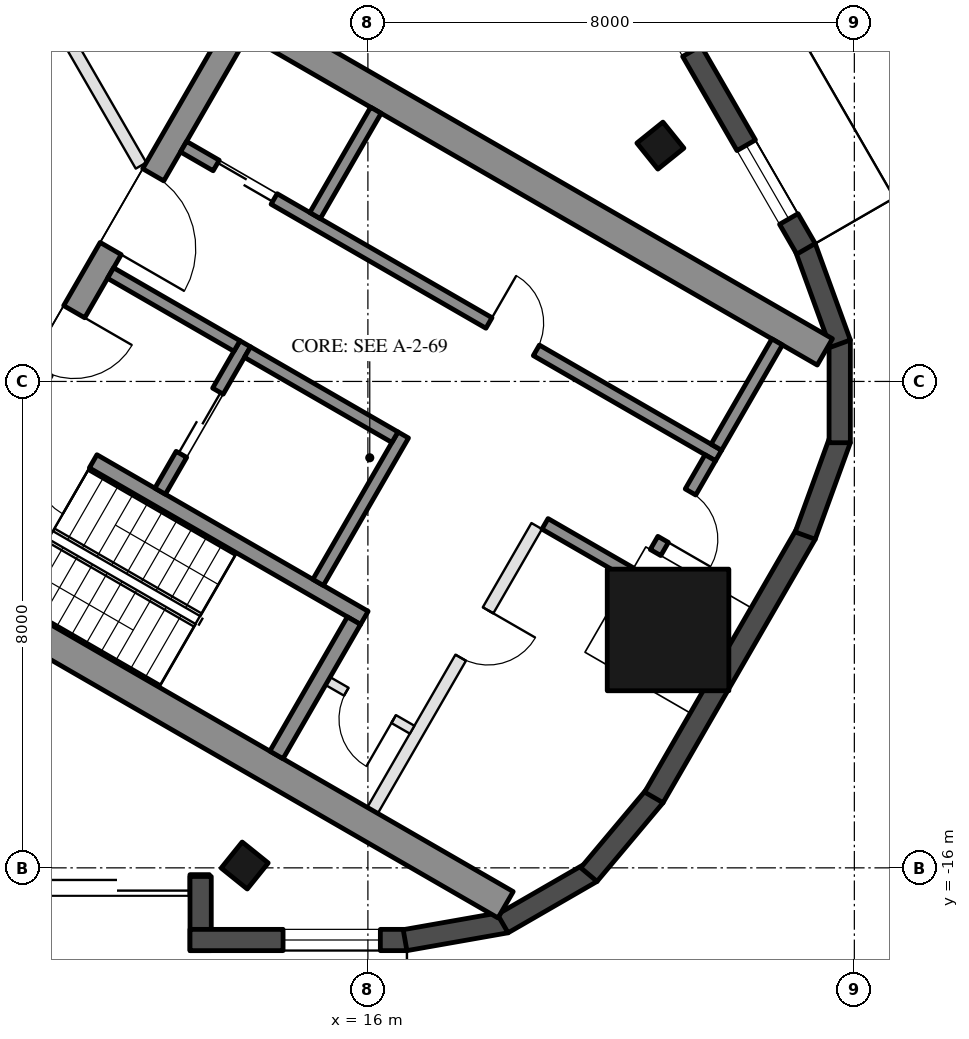
"""IFC4 building model, lengths in metres.
Left out: names, types, materials, properties, quantities, classifications, styles, units other than length and angle.
Written with IfcOpenShell. Run it as: python <this file> out.ifc"""

import sys

from ifc_helpers import new_model, si_unit, direction, frame, frame_2d, origin, origin_2d, place, context, subcontext, project, spatial, rectangle, hollow_rectangle, extrude, boolean, halfspace, element, fill, save


model = new_model("IFC4")
c1 = context("Model", 3, precision=1e-05, world=origin(), true_north=direction((0.0, 1.0)))
c2 = subcontext(c1, "Body", "Model", "MODEL_VIEW")
j1 = project(units=[si_unit("LENGTHUNIT", "METRE"), si_unit("PLANEANGLEUNIT", "RADIAN")], contexts=[c1])
p1 = place(None, origin())
s1 = spatial("IfcSite", under=j1, at=p1, CompositionType="ELEMENT")
p2 = place(p1, origin())
s2 = spatial("IfcBuilding", under=s1, at=p2, CompositionType="ELEMENT")
p3 = place(p2, frame((0.0, 0.0, 298.5)))
s3 = spatial("IfcBuildingStorey", under=s2, at=p3, CompositionType="ELEMENT", Elevation=298.5)
p4 = place(p3, frame((13.974, -15.962, 0.0), z_axis=(-0.121006106938, 0.150399778714, 0.981191840899), x_axis=(0.992607126943, 0.008959505222, 0.121040566785)))
e1 = element("IfcColumn", 1, at=p4, inside=s3, PredefinedType="COLUMN", context=c2, shape_type="SweptSolid", body=[
    boolean("DIFFERENCE", boolean("DIFFERENCE", extrude(hollow_rectangle(XDim=0.55, YDim=0.55, WallThickness=0.025, at=origin_2d()), origin(), (0.0, 0.0, 1.0), 3.771), halfspace(frame((0.0, 0.0, 0.04), z_axis=(0.0, 0.0, 1.0), x_axis=(1.0, 0.0, 0.0)), True)), halfspace(frame((0.0, 0.0, 3.731), z_axis=(0.0, 0.0, 1.0), x_axis=(1.0, 0.0, 0.0)), False)),
])
p5 = place(p3, frame((20.81, -4.121, 0.0), z_axis=(-0.190735837279, 0.02958801006, 0.981195388309), x_axis=(0.488489055842, -0.864137452388, 0.121016138189)))
e2 = element("IfcColumn", 2, at=p5, inside=s3, PredefinedType="COLUMN", context=c2, shape_type="SweptSolid", body=[
    boolean("DIFFERENCE", boolean("DIFFERENCE", extrude(hollow_rectangle(XDim=0.55, YDim=0.55, WallThickness=0.025, at=origin_2d()), origin(), (0.0, 0.0, 1.0), 3.771), halfspace(frame((0.0, 0.0, 0.04), z_axis=(0.0, 0.0, 1.0), x_axis=(1.0, 0.0, 0.0)), True)), halfspace(frame((0.0, 0.0, 3.731), z_axis=(0.0, 0.0, 1.0), x_axis=(1.0, 0.0, 0.0)), False)),
])
p6 = place(p3, frame((20.936, -12.087, 0.0), z_axis=(-0.190408197016, 0.109880592395, 0.975536249416), x_axis=(0.499868084483, 0.866101551773, 1.1510724e-05)))
e3 = element("IfcColumn", 3, at=p6, inside=s3, PredefinedType="COLUMN", context=c2, shape_type="SweptSolid", body=[
    boolean("DIFFERENCE", boolean("DIFFERENCE", extrude(hollow_rectangle(XDim=2.0, YDim=2.0, WallThickness=0.05, at=origin_2d()), origin(), (0.0, 0.0, 1.0), 3.793), halfspace(frame((0.0, 0.0, 0.113), z_axis=(0.0, 0.0, 1.0), x_axis=(1.0, 0.0, 0.0)), True)), halfspace(frame((0.0, 0.0, 3.679), z_axis=(0.0, 0.0, 1.0), x_axis=(1.0, 0.0, 0.0)), False)),
])
p7 = place(p3, frame((7.567, -16.287, 0.0), z_axis=(0.0, 0.0, 1.0), x_axis=(1.0, 0.0, 0.0)))
e4 = element("IfcWall", 4, at=p7, inside=s3, PredefinedType="SOLIDWALL", context=c2, shape_type="SweptSolid", body=[
    extrude(rectangle(XDim=5.827, YDim=0.35, at=frame_2d((2.914, 0.0))), origin(), (0.0, 0.0, 1.0), 3.55),
])
p8 = place(p7, frame((3.107, 0.0, 0.0)))
e5 = element("IfcOpeningElement", 5, at=p8, cuts=e4, PredefinedType="OPENING", context=c2, shape_type="SweptSolid", body=[
    extrude(rectangle(XDim=2.4, YDim=2.4, at=frame_2d((1.2, 1.2))), frame((0.0, 0.185, 0.0), z_axis=(0.0, -1.0, 0.0), x_axis=(1.0, 0.0, 0.0)), (0.0, 0.0, 1.0), 0.37),
])
p9 = place(p7, frame((0.617, 0.0, 0.3)))
e6 = element("IfcOpeningElement", 6, at=p9, cuts=e4, PredefinedType="OPENING", context=c2, shape_type="SweptSolid", body=[
    extrude(rectangle(XDim=2.1, YDim=2.65, at=frame_2d((1.05, 1.325))), frame((0.0, 0.185, 0.0), z_axis=(0.0, -1.0, 0.0), x_axis=(1.0, 0.0, 0.0)), (0.0, 0.0, 1.0), 0.37),
])
p10 = place(p3, frame((13.249, -16.142, 0.0), z_axis=(0.0, 0.0, 1.0), x_axis=(0.0, -1.0, 0.0)))
e7 = element("IfcWall", 7, at=p10, inside=s3, PredefinedType="SOLIDWALL", context=c2, shape_type="SweptSolid", body=[
    extrude(rectangle(XDim=1.22, YDim=0.35, at=frame_2d((0.61, 0.0))), origin(), (0.0, 0.0, 1.0), 3.55),
])
p11 = place(p3, frame((13.074, -17.187, 0.0), z_axis=(0.0, 0.0, 1.0), x_axis=(1.0, 0.0, 0.0)))
e8 = element("IfcWall", 8, at=p11, inside=s3, PredefinedType="SOLIDWALL", context=c2, shape_type="SweptSolid", body=[
    extrude(rectangle(XDim=3.567, YDim=0.35, at=frame_2d((1.784, 0.0))), origin(), (0.0, 0.0, 1.0), 3.55),
])
p12 = place(p11, frame((1.531, 0.0, 0.3)))
e9 = element("IfcOpeningElement", 9, at=p12, cuts=e8, PredefinedType="OPENING", context=c2, shape_type="SweptSolid", body=[
    extrude(rectangle(XDim=1.6, YDim=2.65, at=frame_2d((0.8, 1.325))), frame((0.0, 0.185, 0.0), z_axis=(0.0, -1.0, 0.0), x_axis=(1.0, 0.0, 0.0)), (0.0, 0.0, 1.0), 0.37),
])
for number, where, z_axis, x_axis in (
    (10, (16.611, -17.189, 0.0), (0.0, 0.0, 1.0), (0.985, 0.174, 0.0)),
    (11, (18.218, -16.917, 0.0), (0.0, 0.0, 1.0), (0.866, 0.5, 0.0)),
):
    element("IfcWall", number, at=place(p3, frame(where, z_axis=z_axis, x_axis=x_axis)), inside=s3, PredefinedType="SOLIDWALL", context=c2, shape_type="SweptSolid", body=[
        extrude(rectangle(XDim=1.689, YDim=0.35, at=frame_2d((0.845, 0.0))), origin(), (0.0, 0.0, 1.0), 3.55),
    ])
p13 = place(p3, frame((19.635, -16.111, 0.0), z_axis=(0.0, 0.0, 1.0), x_axis=(0.642697100627, 0.766120380127, 0.0)))
e12 = element("IfcWall", 12, at=p13, inside=s3, PredefinedType="SOLIDWALL", context=c2, shape_type="SweptSolid", body=[
    extrude(rectangle(XDim=1.689, YDim=0.35, at=frame_2d((0.845, 0.0))), origin(), (0.0, 0.0, 1.0), 3.55),
])
p14 = place(p3, frame((20.703, -14.842, 0.0), z_axis=(0.0, 0.0, 1.0), x_axis=(0.500016662025, 0.866015783746, 0.0)))
e13 = element("IfcWall", 13, at=p14, inside=s3, PredefinedType="SOLIDWALL", context=c2, shape_type="SweptSolid", body=[
    extrude(rectangle(XDim=5.004, YDim=0.35, at=frame_2d((2.502, 0.0))), origin(), (0.0, 0.0, 1.0), 3.55),
])
for number, where, z_axis, x_axis in (
    (14, (23.192, -10.536, 0.0), (0.0, 0.0, 1.0), (0.342, 0.94, 0.0)),
    (15, (23.759, -9.008, 0.0), (0.0, 0.0, 1.0), (0.0, 1.0, 0.0)),
    (16, (23.77, -7.379, 0.0), (0.0, 0.0, 1.0), (-0.342, 0.94, 0.0)),
):
    element("IfcWall", number, at=place(p3, frame(where, z_axis=z_axis, x_axis=x_axis)), inside=s3, PredefinedType="SOLIDWALL", context=c2, shape_type="SweptSolid", body=[
        extrude(rectangle(XDim=1.689, YDim=0.35, at=frame_2d((0.845, 0.0))), origin(), (0.0, 0.0, 1.0), 3.55),
    ])
p15 = place(p3, frame((23.205, -5.819, 0.0), z_axis=(0.0, 0.0, 1.0), x_axis=(-0.500010118922, 0.866019561543, 0.0)))
e17 = element("IfcWall", 17, at=p15, inside=s3, PredefinedType="SOLIDWALL", context=c2, shape_type="SweptSolid", body=[
    extrude(rectangle(XDim=10.554, YDim=0.35, at=frame_2d((5.277, 0.0))), origin(), (0.0, 0.0, 1.0), 3.55),
])
p16 = place(p15, frame((0.566, 0.0, 0.3)))
e18 = element("IfcOpeningElement", 18, at=p16, cuts=e17, PredefinedType="OPENING", context=c2, shape_type="SweptSolid", body=[
    extrude(rectangle(XDim=1.4, YDim=2.65, at=frame_2d((0.7, 1.325))), frame((0.0, 0.185, 0.0), z_axis=(0.0, -1.0, 0.0), x_axis=(1.0, 0.0, 0.0)), (0.0, 0.0, 1.0), 0.37),
])
p17 = place(p15, frame((6.626, 0.0, 0.0)))
e19 = element("IfcOpeningElement", 19, at=p17, cuts=e17, PredefinedType="OPENING", context=c2, shape_type="SweptSolid", body=[
    extrude(rectangle(XDim=2.4, YDim=2.4, at=frame_2d((1.2, 1.2))), frame((0.0, 0.185, 0.0), z_axis=(0.0, -1.0, 0.0), x_axis=(1.0, 0.0, 0.0)), (0.0, 0.0, 1.0), 0.37),
])
p18 = place(p15, frame((3.754, 0.0, 0.3)))
e20 = element("IfcOpeningElement", 20, at=p18, cuts=e17, PredefinedType="OPENING", context=c2, shape_type="SweptSolid", body=[
    extrude(rectangle(XDim=2.5, YDim=2.65, at=frame_2d((1.25, 1.325))), frame((0.0, 0.185, 0.0), z_axis=(0.0, -1.0, 0.0), x_axis=(1.0, 0.0, 0.0)), (0.0, 0.0, 1.0), 0.37),
])
for number, where, z_axis, x_axis in (
    (21, (8.547, -10.997, 0.0), (0.0, 0.0, 1.0), (0.866, -0.5, 0.0)),
    (22, (13.797, -1.903, 0.0), (0.0, 0.0, 1.0), (0.866, -0.5, 0.0)),
):
    element("IfcWall", number, at=place(p3, frame(where, z_axis=z_axis, x_axis=x_axis)), inside=s3, PredefinedType="SHEAR", context=c2, shape_type="SweptSolid", body=[
        extrude(rectangle(XDim=11.222, YDim=0.5, at=frame_2d((5.611, 0.0))), origin(), (0.0, 0.0, 1.0), 3.5),
    ])
p19 = place(p3, frame((8.845, -10.88, 0.0), z_axis=(0.0, 0.0, 1.0), x_axis=(0.500004234368, 0.866022959057, 0.0)))
e23 = element("IfcWall", 23, at=p19, inside=s3, PredefinedType="SHEAR", context=c2, shape_type="SweptSolid", body=[
    extrude(rectangle(XDim=10.0, YDim=0.4, at=frame_2d((5.0, 0.0))), origin(), (0.0, 0.0, 1.0), 3.5),
])
p20 = place(p19, frame((3.55, 0.0, 0.0)))
e24 = element("IfcOpeningElement", 24, at=p20, cuts=e23, PredefinedType="OPENING", context=c2, shape_type="SweptSolid", body=[
    extrude(rectangle(XDim=1.1, YDim=2.1, at=frame_2d((0.55, 1.05))), frame((0.0, 0.21, 0.0), z_axis=(0.0, -1.0, 0.0), x_axis=(1.0, 0.0, 0.0)), (0.0, 0.0, 1.0), 0.42),
])
p21 = place(p19, frame((5.85, 0.0, 0.0)))
e25 = element("IfcOpeningElement", 25, at=p21, cuts=e23, PredefinedType="OPENING", context=c2, shape_type="SweptSolid", body=[
    extrude(rectangle(XDim=1.4, YDim=2.1, at=frame_2d((0.7, 1.05))), frame((0.0, 0.21, 0.0), z_axis=(0.0, -1.0, 0.0), x_axis=(1.0, 0.0, 0.0)), (0.0, 0.0, 1.0), 0.42),
])
p22 = place(p3, frame((10.356, -8.664, 0.0), z_axis=(0.0, 0.0, 1.0), x_axis=(0.866028629588, -0.499994412703, 0.0)))
e26 = element("IfcWall", 26, at=p22, inside=s3, PredefinedType="SHEAR", context=c2, shape_type="SweptSolid", body=[
    extrude(rectangle(XDim=6.45, YDim=0.25, at=frame_2d((3.225, 0.0))), origin(), (0.0, 0.0, 1.0), 3.5),
])
p23 = place(p22, frame((0.3, 0.0, 0.0)))
e27 = element("IfcOpeningElement", 27, at=p23, cuts=e26, PredefinedType="OPENING", context=c2, shape_type="SweptSolid", body=[
    extrude(rectangle(XDim=1.0, YDim=2.1, at=frame_2d((0.5, 1.05))), frame((0.0, 0.135, 0.0), z_axis=(0.0, -1.0, 0.0), x_axis=(1.0, 0.0, 0.0)), (0.0, 0.0, 1.0), 0.27),
])
p24 = place(p3, frame((14.496, -14.143, 0.0), z_axis=(0.0, 0.0, 1.0), x_axis=(0.500062241894, 0.865989465428, 0.0)))
e28 = element("IfcWall", 28, at=p24, inside=s3, PredefinedType="SHEAR", context=c2, shape_type="SweptSolid", body=[
    extrude(rectangle(XDim=2.55, YDim=0.25, at=frame_2d((1.275, 0.0))), origin(), (0.0, 0.0, 1.0), 3.5),
])
p25 = place(p3, frame((15.181, -11.305, 0.0), z_axis=(0.0, 0.0, 1.0), x_axis=(0.49994636267, 0.866056369097, 0.0)))
e29 = element("IfcWall", 29, at=p25, inside=s3, PredefinedType="SHEAR", context=c2, shape_type="SweptSolid", body=[
    extrude(rectangle(XDim=2.8, YDim=0.2, at=frame_2d((1.4, 0.0))), origin(), (0.0, 0.0, 1.0), 3.5),
])
p26 = place(p3, frame((12.583, -9.805, 0.0), z_axis=(0.0, 0.0, 1.0), x_axis=(0.49994636267, 0.866056369097, 0.0)))
e30 = element("IfcWall", 30, at=p26, inside=s3, PredefinedType="SHEAR", context=c2, shape_type="SweptSolid", body=[
    extrude(rectangle(XDim=2.8, YDim=0.2, at=frame_2d((1.4, 0.0))), origin(), (0.0, 0.0, 1.0), 3.5),
])
p27 = place(p26, frame((0.7, 0.0, 0.0)))
e31 = element("IfcOpeningElement", 31, at=p27, cuts=e30, PredefinedType="OPENING", context=c2, shape_type="SweptSolid", body=[
    extrude(rectangle(XDim=1.2, YDim=2.1, at=frame_2d((0.6, 1.05))), frame((0.0, 0.11, 0.0), z_axis=(0.0, -1.0, 0.0), x_axis=(1.0, 0.0, 0.0)), (0.0, 0.0, 1.0), 0.22),
])
p28 = place(p3, frame((11.768, -6.217, 0.0), z_axis=(0.0, 0.0, 1.0), x_axis=(0.866050077142, -0.499957262057, 0.0)))
e32 = element("IfcWall", 32, at=p28, inside=s3, PredefinedType="SHEAR", context=c2, shape_type="SweptSolid", body=[
    extrude(rectangle(XDim=2.4, YDim=0.2, at=frame_2d((1.2, 0.0))), origin(), (0.0, 0.0, 1.0), 3.5),
])
p29 = place(p3, frame((14.02, -7.517, 0.0), z_axis=(0.0, 0.0, 1.0), x_axis=(0.866034573852, -0.49998411664, 0.0)))
e33 = element("IfcWall", 33, at=p29, inside=s3, PredefinedType="SHEAR", context=c2, shape_type="SweptSolid", body=[
    extrude(rectangle(XDim=2.8, YDim=0.2, at=frame_2d((1.4, 0.0))), origin(), (0.0, 0.0, 1.0), 3.5),
])
p30 = place(p3, frame((12.968, -4.138, 0.0), z_axis=(0.0, 0.0, 1.0), x_axis=(0.866028328073, -0.49999493495, 0.0)))
e34 = element("IfcWall", 34, at=p30, inside=s3, PredefinedType="SHEAR", context=c2, shape_type="SweptSolid", body=[
    extrude(rectangle(XDim=10.16, YDim=0.2, at=frame_2d((5.08, 0.0))), origin(), (0.0, 0.0, 1.0), 3.5),
])
p31 = place(p30, frame((0.62, 0.0, 0.0)))
e35 = element("IfcOpeningElement", 35, at=p31, cuts=e34, PredefinedType="OPENING", context=c2, shape_type="SweptSolid", body=[
    extrude(rectangle(XDim=1.1, YDim=2.1, at=frame_2d((0.55, 1.05))), frame((0.0, 0.11, 0.0), z_axis=(0.0, -1.0, 0.0), x_axis=(1.0, 0.0, 0.0)), (0.0, 0.0, 1.0), 0.22),
])
p32 = place(p30, frame((5.8, 0.0, 0.0)))
e36 = element("IfcOpeningElement", 36, at=p32, cuts=e34, PredefinedType="OPENING", context=c2, shape_type="SweptSolid", body=[
    extrude(rectangle(XDim=0.9, YDim=2.1, at=frame_2d((0.45, 1.05))), frame((0.0, 0.11, 0.0), z_axis=(0.0, -1.0, 0.0), x_axis=(1.0, 0.0, 0.0)), (0.0, 0.0, 1.0), 0.22),
])
p33 = place(p3, frame((20.73, -10.814, 0.0), z_axis=(0.0, 0.0, 1.0), x_axis=(0.499961193289, 0.866047807691, 0.0)))
e37 = element("IfcWall", 37, at=p33, inside=s3, PredefinedType="SHEAR", context=c2, shape_type="SweptSolid", body=[
    extrude(rectangle(XDim=1.8, YDim=0.2, at=frame_2d((0.9, 0.0))), origin(), (0.0, 0.0, 1.0), 3.5),
])
p34 = place(p33, frame((0.25, 0.0, 0.0)))
e38 = element("IfcOpeningElement", 38, at=p34, cuts=e37, PredefinedType="OPENING", context=c2, shape_type="SweptSolid", body=[
    extrude(rectangle(XDim=0.9, YDim=2.1, at=frame_2d((0.45, 1.05))), frame((0.0, 0.11, 0.0), z_axis=(0.0, -1.0, 0.0), x_axis=(1.0, 0.0, 0.0)), (0.0, 0.0, 1.0), 0.22),
])
p35 = place(p3, frame((18.913, -10.342, 0.0), z_axis=(0.0, 0.0, 1.0), x_axis=(0.866053003207, -0.499952193351, 0.0)))
e39 = element("IfcWall", 39, at=p35, inside=s3, PredefinedType="SHEAR", context=c2, shape_type="SweptSolid", body=[
    extrude(rectangle(XDim=1.625, YDim=0.2, at=frame_2d((0.812, 0.0))), origin(), (0.0, 0.0, 1.0), 3.5),
])
for number, where, z_axis, x_axis in (
    (40, (15.131, -5.272, 0.0), (0.0, 0.0, 1.0), (0.5, 0.866, 0.0)),
    (41, (21.73, -9.082, 0.0), (0.0, 0.0, 1.0), (0.5, 0.866, 0.0)),
):
    element("IfcWall", number, at=place(p3, frame(where, z_axis=z_axis, x_axis=x_axis)), inside=s3, PredefinedType="SHEAR", context=c2, shape_type="SweptSolid", body=[
        extrude(rectangle(XDim=2.0, YDim=0.2, at=frame_2d((1.0, 0.0))), origin(), (0.0, 0.0, 1.0), 3.5),
    ])
p36 = place(p3, frame((16.076, -15.055, 0.0), z_axis=(0.0, 0.0, 1.0), x_axis=(0.499995103361, 0.866028230842, 0.0)))
e42 = element("IfcWall", 42, at=p36, inside=s3, PredefinedType="PARTITIONING", context=c2, shape_type="SweptSolid", body=[
    extrude(rectangle(XDim=5.4, YDim=0.2, at=frame_2d((2.7, 0.0))), origin(), (0.0, 0.0, 1.0), 3.5),
])
p37 = place(p36, frame((2.9, 0.0, 0.0)))
e43 = element("IfcOpeningElement", 43, at=p37, cuts=e42, PredefinedType="OPENING", context=c2, shape_type="SweptSolid", body=[
    extrude(rectangle(XDim=0.9, YDim=2.1, at=frame_2d((0.45, 1.05))), frame((0.0, 0.11, 0.0), z_axis=(0.0, -1.0, 0.0), x_axis=(1.0, 0.0, 0.0)), (0.0, 0.0, 1.0), 0.22),
])
p38 = place(p3, frame((15.342, -12.928, 0.0), z_axis=(0.0, 0.0, 1.0), x_axis=(0.865989903783, -0.500061482766, 0.0)))
e44 = element("IfcWall", 44, at=p38, inside=s3, PredefinedType="PARTITIONING", context=c2, shape_type="SweptSolid", body=[
    extrude(rectangle(XDim=1.6, YDim=0.15, at=frame_2d((0.8, 0.0))), origin(), (0.0, 0.0, 1.0), 3.5),
])
p39 = place(p38, frame((0.35, 0.0, 0.0)))
e45 = element("IfcOpeningElement", 45, at=p39, cuts=e44, PredefinedType="OPENING", context=c2, shape_type="SweptSolid", body=[
    extrude(rectangle(XDim=0.9, YDim=2.1, at=frame_2d((0.45, 1.05))), frame((0.0, 0.085, 0.0), z_axis=(0.0, -1.0, 0.0), x_axis=(1.0, 0.0, 0.0)), (0.0, 0.0, 1.0), 0.17),
])
p40 = place(p3, frame((8.275, 2.468, 0.0), z_axis=(0.0, 0.0, 1.0), x_axis=(0.500004647933, -0.866022720283, 0.0)))
e46 = element("IfcWall", 46, at=p40, inside=s3, PredefinedType="PARTITIONING", context=c2, shape_type="SweptSolid", body=[
    extrude(rectangle(XDim=7.988, YDim=0.2, at=frame_2d((3.994, 0.0))), origin(), (0.0, 0.0, 1.0), 3.1),
])
p41 = place(p40, frame((2.45, 0.0, 0.0)))
e47 = element("IfcOpeningElement", 47, at=p41, cuts=e46, PredefinedType="OPENING", context=c2, shape_type="SweptSolid", body=[
    extrude(rectangle(XDim=1.0, YDim=2.1, at=frame_2d((0.5, 1.05))), frame((0.0, 0.11, 0.0), z_axis=(0.0, -1.0, 0.0), x_axis=(1.0, 0.0, 0.0)), (0.0, 0.0, 1.0), 0.22),
])
p42 = place(p8, frame((2.4, 0.0, 0.0), z_axis=(0.0, 0.0, 1.0), x_axis=(-1.0, 0.0, 0.0)))
e48 = element("IfcDoor", 48, at=p42, inside=s3, OperationType="SLIDING_TO_LEFT", PredefinedType="DOOR", context=c2, shape_type="SweptSolid", body=[
    extrude(rectangle(XDim=2.4, YDim=2.4, at=frame_2d((1.2, 1.2))), frame((0.0, 0.025, 0.0), z_axis=(0.0, -1.0, 0.0), x_axis=(1.0, 0.0, 0.0)), (0.0, 0.0, 1.0), 0.05),
])
fill(e5, e48)
p43 = place(p12, origin())
e49 = element("IfcWindow", 49, at=p43, inside=s3, PartitioningType="SINGLE_PANEL", PredefinedType="WINDOW", context=c2, shape_type="SweptSolid", body=[
    extrude(rectangle(XDim=1.6, YDim=2.65, at=frame_2d((0.8, 1.325))), frame((0.0, 0.03, 0.0), z_axis=(0.0, -1.0, 0.0), x_axis=(1.0, 0.0, 0.0)), (0.0, 0.0, 1.0), 0.06),
])
fill(e9, e49)
p44 = place(p16, origin())
e50 = element("IfcWindow", 50, at=p44, inside=s3, PartitioningType="SINGLE_PANEL", PredefinedType="WINDOW", context=c2, shape_type="SweptSolid", body=[
    extrude(rectangle(XDim=1.4, YDim=2.65, at=frame_2d((0.7, 1.325))), frame((0.0, 0.03, 0.0), z_axis=(0.0, -1.0, 0.0), x_axis=(1.0, 0.0, 0.0)), (0.0, 0.0, 1.0), 0.06),
])
fill(e18, e50)
p45 = place(p27, origin())
e51 = element("IfcDoor", 51, at=p45, inside=s3, OperationType="DOUBLE_DOOR_SLIDING", PredefinedType="DOOR", context=c2, shape_type="SweptSolid", body=[
    extrude(rectangle(XDim=1.2, YDim=2.1, at=frame_2d((0.6, 1.05))), frame((0.0, 0.025, 0.0), z_axis=(0.0, -1.0, 0.0), x_axis=(1.0, 0.0, 0.0)), (0.0, 0.0, 1.0), 0.05),
])
fill(e31, e51)
p46 = place(p39, frame((0.9, 0.0, 0.0), z_axis=(0.0, 0.0, 1.0), x_axis=(-1.0, 0.0, 0.0)))
e52 = element("IfcDoor", 52, at=p46, inside=s3, OperationType="SINGLE_SWING_LEFT", PredefinedType="DOOR", context=c2, shape_type="SweptSolid", body=[
    extrude(rectangle(XDim=0.9, YDim=2.1, at=frame_2d((0.45, 1.05))), frame((0.0, 0.025, 0.0), z_axis=(0.0, -1.0, 0.0), x_axis=(1.0, 0.0, 0.0)), (0.0, 0.0, 1.0), 0.05),
])
fill(e45, e52)
p47 = place(p31, origin())
e53 = element("IfcDoor", 53, at=p47, inside=s3, OperationType="DOUBLE_DOOR_SLIDING", PredefinedType="DOOR", context=c2, shape_type="SweptSolid", body=[
    extrude(rectangle(XDim=1.1, YDim=2.1, at=frame_2d((0.55, 1.05))), frame((0.0, 0.025, 0.0), z_axis=(0.0, -1.0, 0.0), x_axis=(1.0, 0.0, 0.0)), (0.0, 0.0, 1.0), 0.05),
])
fill(e35, e53)
p48 = place(p32, origin())
e54 = element("IfcDoor", 54, at=p48, inside=s3, OperationType="SINGLE_SWING_LEFT", PredefinedType="DOOR", context=c2, shape_type="SweptSolid", body=[
    extrude(rectangle(XDim=0.9, YDim=2.1, at=frame_2d((0.45, 1.05))), frame((0.0, 0.025, 0.0), z_axis=(0.0, -1.0, 0.0), x_axis=(1.0, 0.0, 0.0)), (0.0, 0.0, 1.0), 0.05),
])
fill(e36, e54)
p49 = place(p34, frame((0.9, 0.0, 0.0), z_axis=(0.0, 0.0, 1.0), x_axis=(-1.0, 0.0, 0.0)))
e55 = element("IfcDoor", 55, at=p49, inside=s3, OperationType="SINGLE_SWING_RIGHT", PredefinedType="DOOR", context=c2, shape_type="SweptSolid", body=[
    extrude(rectangle(XDim=0.9, YDim=2.1, at=frame_2d((0.45, 1.05))), frame((0.0, 0.025, 0.0), z_axis=(0.0, -1.0, 0.0), x_axis=(1.0, 0.0, 0.0)), (0.0, 0.0, 1.0), 0.05),
])
fill(e38, e55)
p50 = place(p37, frame((0.9, 0.0, 0.0), z_axis=(0.0, 0.0, 1.0), x_axis=(-1.0, 0.0, 0.0)))
e56 = element("IfcDoor", 56, at=p50, inside=s3, OperationType="SINGLE_SWING_LEFT", PredefinedType="DOOR", context=c2, shape_type="SweptSolid", body=[
    extrude(rectangle(XDim=0.9, YDim=2.1, at=frame_2d((0.45, 1.05))), frame((0.0, 0.025, 0.0), z_axis=(0.0, -1.0, 0.0), x_axis=(1.0, 0.0, 0.0)), (0.0, 0.0, 1.0), 0.05),
])
fill(e43, e56)
p51 = place(p20, frame((1.1, 0.0, 0.0), z_axis=(0.0, 0.0, 1.0), x_axis=(-1.0, 0.0, 0.0)))
e57 = element("IfcDoor", 57, at=p51, inside=s3, OperationType="SINGLE_SWING_LEFT", PredefinedType="DOOR", context=c2, shape_type="SweptSolid", body=[
    extrude(rectangle(XDim=1.1, YDim=2.1, at=frame_2d((0.55, 1.05))), frame((0.0, 0.025, 0.0), z_axis=(0.0, -1.0, 0.0), x_axis=(1.0, 0.0, 0.0)), (0.0, 0.0, 1.0), 0.05),
])
fill(e24, e57)
p52 = place(p21, frame((1.4, 0.0, 0.0), z_axis=(0.0, 0.0, 1.0), x_axis=(-1.0, 0.0, 0.0)))
e58 = element("IfcDoor", 58, at=p52, inside=s3, OperationType="DOUBLE_DOOR_SINGLE_SWING", PredefinedType="DOOR", context=c2, shape_type="SweptSolid", body=[
    extrude(rectangle(XDim=1.4, YDim=2.1, at=frame_2d((0.7, 1.05))), frame((0.0, 0.025, 0.0), z_axis=(0.0, -1.0, 0.0), x_axis=(1.0, 0.0, 0.0)), (0.0, 0.0, 1.0), 0.05),
])
fill(e25, e58)
p53 = place(p23, frame((1.0, 0.0, 0.0), z_axis=(0.0, 0.0, 1.0), x_axis=(-1.0, 0.0, 0.0)))
e59 = element("IfcDoor", 59, at=p53, inside=s3, OperationType="SINGLE_SWING_LEFT", PredefinedType="DOOR", context=c2, shape_type="SweptSolid", body=[
    extrude(rectangle(XDim=1.0, YDim=2.1, at=frame_2d((0.5, 1.05))), frame((0.0, 0.025, 0.0), z_axis=(0.0, -1.0, 0.0), x_axis=(1.0, 0.0, 0.0)), (0.0, 0.0, 1.0), 0.05),
])
fill(e27, e59)
save(model, sys.argv[1])
